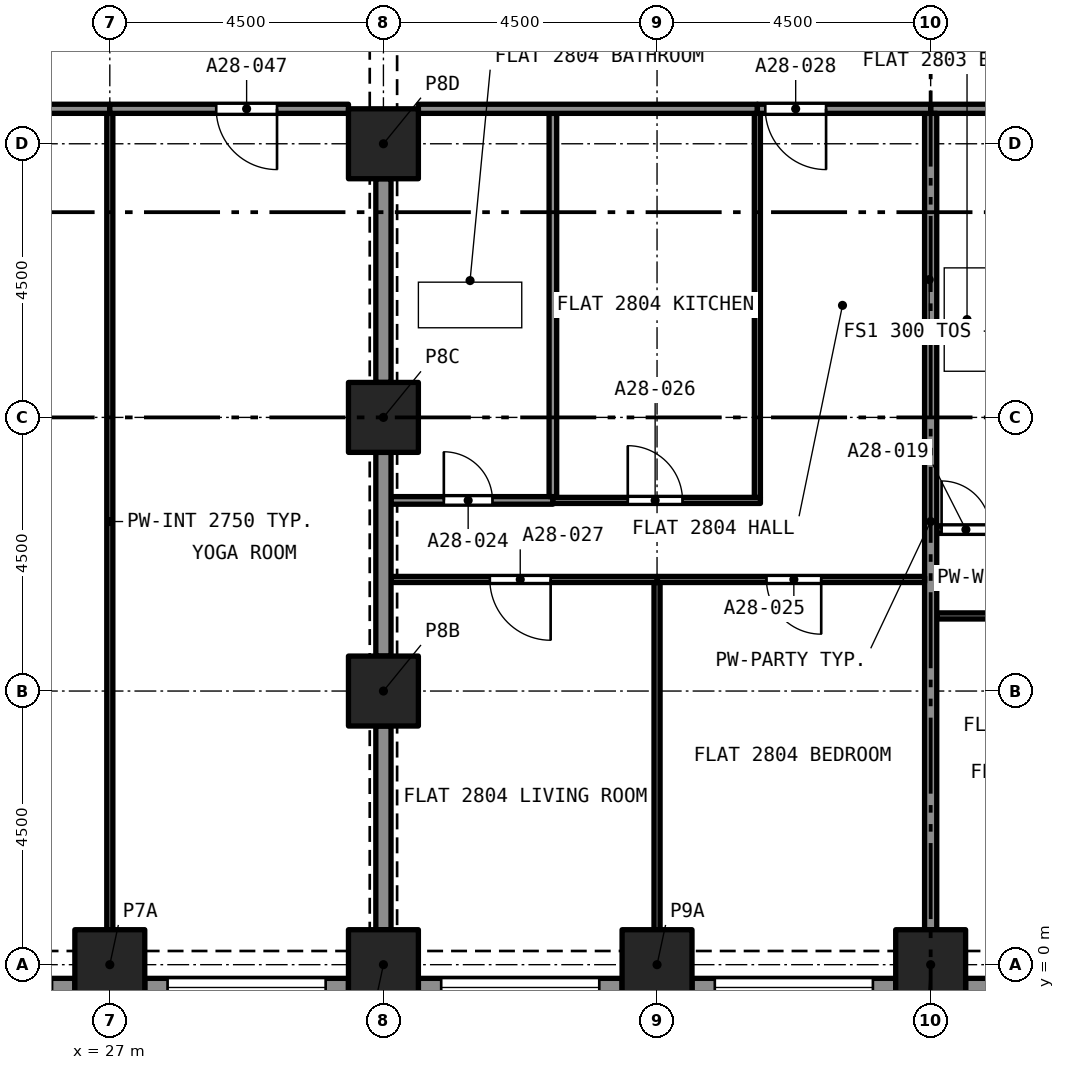
"""IFC4 building model, lengths in metres.
Left out: names, types, materials, properties, quantities, classifications, styles, units other than length and angle.
Written with IfcOpenShell. Run it as: python <this file> out.ifc"""

import sys

from ifc_helpers import new_model, si_unit, direction, frame, frame_2d, origin, origin_2d, place, context, subcontext, project, spatial, rectangle, extrude, element, fill, save


model = new_model("IFC4")
c1 = context("Model", 3, precision=1e-05, world=origin(), true_north=direction((0.0, 1.0)))
c2 = subcontext(c1, "Body", "Model", "MODEL_VIEW")
j1 = project(units=[si_unit("LENGTHUNIT", "METRE"), si_unit("PLANEANGLEUNIT", "RADIAN")], contexts=[c1])
p1 = place(None, origin())
s1 = spatial("IfcSite", under=j1, at=p1, CompositionType="ELEMENT")
p2 = place(p1, origin())
s2 = spatial("IfcBuilding", under=s1, at=p2, CompositionType="ELEMENT")
p3 = place(p2, frame((0.0, 0.0, 102.4)))
s3 = spatial("IfcBuildingStorey", under=s2, at=p3, CompositionType="ELEMENT", Elevation=102.4)
for number, where, z_axis, x_axis in (
    (1, (27.0, 0.0, 0.0), (0.0, 0.0, 1.0), (1.0, 0.0, 0.0)),
    (2, (31.5, 0.0, 0.0), (0.0, 0.0, 1.0), (1.0, 0.0, 0.0)),
    (3, (36.0, 0.0, 0.0), (0.0, 0.0, 1.0), (1.0, 0.0, 0.0)),
    (4, (40.5, 0.0, 0.0), (0.0, 0.0, 1.0), (1.0, 0.0, 0.0)),
    (5, (31.5, 4.5, 0.0), (0.0, 0.0, 1.0), (1.0, 0.0, 0.0)),
    (6, (31.5, 9.0, 0.0), (0.0, 0.0, 1.0), (1.0, 0.0, 0.0)),
    (7, (31.5, 13.5, 0.0), (0.0, 0.0, 1.0), (1.0, 0.0, 0.0)),
):
    element("IfcColumn", number, at=place(p3, frame(where, z_axis=z_axis, x_axis=x_axis)), inside=s3, PredefinedType="COLUMN", context=c2, shape_type="SweptSolid", body=[
        extrude(rectangle(XDim=1.15, YDim=1.15, at=origin_2d()), origin(), (0.0, 0.0, 1.0), 3.2),
    ])
p4 = place(p3, frame((26.425, -0.375, 0.0), z_axis=(0.0, 0.0, 1.0), x_axis=(-1.0, 0.0, 0.0)))
e8 = element("IfcWall", 8, at=p4, inside=s3, PredefinedType="SOLIDWALL", context=c2, shape_type="SweptSolid", body=[
    extrude(rectangle(XDim=3.35, YDim=0.3, at=frame_2d((1.675, 0.0))), origin(), (0.0, 0.0, 1.0), 3.2),
])
p5 = place(p4, frame((0.375, 0.0, 0.45)))
e9 = element("IfcOpeningElement", 9, at=p5, cuts=e8, PredefinedType="OPENING", context=c2, shape_type="SweptSolid", body=[
    extrude(rectangle(XDim=2.6, YDim=1.95, at=frame_2d((1.3, 0.975))), frame((0.0, 0.16, 0.0), z_axis=(0.0, -1.0, 0.0), x_axis=(1.0, 0.0, 0.0)), (0.0, 0.0, 1.0), 0.32),
])
p6 = place(p3, frame((30.925, -0.375, 0.0), z_axis=(0.0, 0.0, 1.0), x_axis=(-1.0, 0.0, 0.0)))
e10 = element("IfcWall", 10, at=p6, inside=s3, PredefinedType="SOLIDWALL", context=c2, shape_type="SweptSolid", body=[
    extrude(rectangle(XDim=3.35, YDim=0.3, at=frame_2d((1.675, 0.0))), origin(), (0.0, 0.0, 1.0), 3.2),
])
p7 = place(p6, frame((0.375, 0.0, 0.45)))
e11 = element("IfcOpeningElement", 11, at=p7, cuts=e10, PredefinedType="OPENING", context=c2, shape_type="SweptSolid", body=[
    extrude(rectangle(XDim=2.6, YDim=1.95, at=frame_2d((1.3, 0.975))), frame((0.0, 0.16, 0.0), z_axis=(0.0, -1.0, 0.0), x_axis=(1.0, 0.0, 0.0)), (0.0, 0.0, 1.0), 0.32),
])
p8 = place(p3, frame((35.425, -0.375, 0.0), z_axis=(0.0, 0.0, 1.0), x_axis=(-1.0, 0.0, 0.0)))
e12 = element("IfcWall", 12, at=p8, inside=s3, PredefinedType="SOLIDWALL", context=c2, shape_type="SweptSolid", body=[
    extrude(rectangle(XDim=3.35, YDim=0.3, at=frame_2d((1.675, 0.0))), origin(), (0.0, 0.0, 1.0), 3.2),
])
p9 = place(p8, frame((0.375, 0.0, 0.45)))
e13 = element("IfcOpeningElement", 13, at=p9, cuts=e12, PredefinedType="OPENING", context=c2, shape_type="SweptSolid", body=[
    extrude(rectangle(XDim=2.6, YDim=1.95, at=frame_2d((1.3, 0.975))), frame((0.0, 0.16, 0.0), z_axis=(0.0, -1.0, 0.0), x_axis=(1.0, 0.0, 0.0)), (0.0, 0.0, 1.0), 0.32),
])
p10 = place(p3, frame((39.925, -0.375, 0.0), z_axis=(0.0, 0.0, 1.0), x_axis=(-1.0, 0.0, 0.0)))
e14 = element("IfcWall", 14, at=p10, inside=s3, PredefinedType="SOLIDWALL", context=c2, shape_type="SweptSolid", body=[
    extrude(rectangle(XDim=3.35, YDim=0.3, at=frame_2d((1.675, 0.0))), origin(), (0.0, 0.0, 1.0), 3.2),
])
p11 = place(p10, frame((0.375, 0.0, 0.45)))
e15 = element("IfcOpeningElement", 15, at=p11, cuts=e14, PredefinedType="OPENING", context=c2, shape_type="SweptSolid", body=[
    extrude(rectangle(XDim=2.6, YDim=1.95, at=frame_2d((1.3, 0.975))), frame((0.0, 0.16, 0.0), z_axis=(0.0, -1.0, 0.0), x_axis=(1.0, 0.0, 0.0)), (0.0, 0.0, 1.0), 0.32),
])
p12 = place(p3, frame((44.425, -0.375, 0.0), z_axis=(0.0, 0.0, 1.0), x_axis=(-1.0, 0.0, 0.0)))
e16 = element("IfcWall", 16, at=p12, inside=s3, PredefinedType="SOLIDWALL", context=c2, shape_type="SweptSolid", body=[
    extrude(rectangle(XDim=3.35, YDim=0.3, at=frame_2d((1.675, 0.0))), origin(), (0.0, 0.0, 1.0), 3.2),
])
p13 = place(p12, frame((0.375, 0.0, 0.45)))
e17 = element("IfcOpeningElement", 17, at=p13, cuts=e16, PredefinedType="OPENING", context=c2, shape_type="SweptSolid", body=[
    extrude(rectangle(XDim=2.6, YDim=1.95, at=frame_2d((1.3, 0.975))), frame((0.0, 0.16, 0.0), z_axis=(0.0, -1.0, 0.0), x_axis=(1.0, 0.0, 0.0)), (0.0, 0.0, 1.0), 0.32),
])
p14 = place(p3, frame((40.6, 7.155, 0.0), z_axis=(0.0, 0.0, 1.0), x_axis=(1.0, 0.0, 0.0)))
e18 = element("IfcWall", 18, at=p14, inside=s3, PredefinedType="PARTITIONING", context=c2, shape_type="SweptSolid", body=[
    extrude(rectangle(XDim=1.059, YDim=0.125, at=frame_2d((0.53, 0.0))), origin(), (0.0, 0.0, 1.0), 2.9),
])
p15 = place(p14, frame((0.08, 0.0, 0.0)))
e19 = element("IfcOpeningElement", 19, at=p15, cuts=e18, PredefinedType="OPENING", context=c2, shape_type="SweptSolid", body=[
    extrude(rectangle(XDim=0.8, YDim=2.1, at=frame_2d((0.4, 1.05))), frame((0.0, 0.073, 0.0), z_axis=(0.0, -1.0, 0.0), x_axis=(1.0, 0.0, 0.0)), (0.0, 0.0, 1.0), 0.145),
])
p16 = place(p3, frame((40.5, 14.075, 0.0), z_axis=(0.0, 0.0, 1.0), x_axis=(1.0, 0.0, 0.0)))
e20 = element("IfcWall", 20, at=p16, inside=s3, PredefinedType="PARTITIONING", context=c2, shape_type="SweptSolid", body=[
    extrude(rectangle(XDim=2.55, YDim=0.15, at=frame_2d((1.275, 0.0))), origin(), (0.0, 0.0, 1.0), 2.9),
])
p17 = place(p3, frame((44.95, 5.735, 0.0), z_axis=(0.0, 0.0, 1.0), x_axis=(-1.0, 0.0, 0.0)))
e21 = element("IfcWall", 21, at=p17, inside=s3, PredefinedType="PARTITIONING", context=c2, shape_type="SweptSolid", body=[
    extrude(rectangle(XDim=4.35, YDim=0.1, at=frame_2d((2.175, 0.0))), origin(), (0.0, 0.0, 1.0), 2.9),
])
p18 = place(p17, frame((1.75, 0.0, 0.0)))
e22 = element("IfcOpeningElement", 22, at=p18, cuts=e21, PredefinedType="OPENING", context=c2, shape_type="SweptSolid", body=[
    extrude(rectangle(XDim=0.9, YDim=2.1, at=frame_2d((0.45, 1.05))), frame((0.0, 0.06, 0.0), z_axis=(0.0, -1.0, 0.0), x_axis=(1.0, 0.0, 0.0)), (0.0, 0.0, 1.0), 0.12),
])
p19 = place(p3, frame((40.5, 0.575, 0.0), z_axis=(0.0, 0.0, 1.0), x_axis=(0.0, 1.0, 0.0)))
e23 = element("IfcWall", 23, at=p19, inside=s3, PredefinedType="PARTITIONING", context=c2, shape_type="SweptSolid", body=[
    extrude(rectangle(XDim=13.425, YDim=0.2, at=frame_2d((6.712, 0.0))), origin(), (0.0, 0.0, 1.0), 2.9),
])
p20 = place(p3, frame((31.625, 7.635, 0.0), z_axis=(0.0, 0.0, 1.0), x_axis=(1.0, 0.0, 0.0)))
e24 = element("IfcWall", 24, at=p20, inside=s3, PredefinedType="PARTITIONING", context=c2, shape_type="SweptSolid", body=[
    extrude(rectangle(XDim=2.662, YDim=0.125, at=frame_2d((1.331, 0.0))), origin(), (0.0, 0.0, 1.0), 2.9),
])
p21 = place(p20, frame((0.868, 0.0, 0.0)))
e25 = element("IfcOpeningElement", 25, at=p21, cuts=e24, PredefinedType="OPENING", context=c2, shape_type="SweptSolid", body=[
    extrude(rectangle(XDim=0.8, YDim=2.1, at=frame_2d((0.4, 1.05))), frame((0.0, 0.073, 0.0), z_axis=(0.0, -1.0, 0.0), x_axis=(1.0, 0.0, 0.0)), (0.0, 0.0, 1.0), 0.145),
])
p22 = place(p3, frame((34.287, 7.698, 0.0), z_axis=(0.0, 0.0, 1.0), x_axis=(0.0, 1.0, 0.0)))
e26 = element("IfcWall", 26, at=p22, inside=s3, PredefinedType="PARTITIONING", context=c2, shape_type="SweptSolid", body=[
    extrude(rectangle(XDim=6.302, YDim=0.125, at=frame_2d((3.151, 0.0))), origin(), (0.0, 0.0, 1.0), 2.9),
])
p23 = place(p3, frame((31.5, 9.575, 0.0), z_axis=(0.0, 0.0, 1.0), x_axis=(0.0, 1.0, 0.0)))
e27 = element("IfcWall", 27, at=p23, inside=s3, PredefinedType="PARTITIONING", context=c2, shape_type="SweptSolid", body=[
    extrude(rectangle(XDim=3.35, YDim=0.25, at=frame_2d((1.675, 0.0))), origin(), (0.0, 0.0, 1.0), 2.38),
])
p24 = place(p3, frame((32.075, 14.075, 0.0), z_axis=(0.0, 0.0, 1.0), x_axis=(1.0, 0.0, 0.0)))
e28 = element("IfcWall", 28, at=p24, inside=s3, PredefinedType="PARTITIONING", context=c2, shape_type="SweptSolid", body=[
    extrude(rectangle(XDim=5.575, YDim=0.15, at=frame_2d((2.788, 0.0))), origin(), (0.0, 0.0, 1.0), 2.9),
])
p25 = place(p3, frame((40.4, 6.335, 0.0), z_axis=(0.0, 0.0, 1.0), x_axis=(-1.0, 0.0, 0.0)))
e29 = element("IfcWall", 29, at=p25, inside=s3, PredefinedType="PARTITIONING", context=c2, shape_type="SweptSolid", body=[
    extrude(rectangle(XDim=4.4, YDim=0.1, at=frame_2d((2.2, 0.0))), origin(), (0.0, 0.0, 1.0), 2.9),
])
p26 = place(p25, frame((1.7, 0.0, 0.0)))
e30 = element("IfcOpeningElement", 30, at=p26, cuts=e29, PredefinedType="OPENING", context=c2, shape_type="SweptSolid", body=[
    extrude(rectangle(XDim=0.9, YDim=2.1, at=frame_2d((0.45, 1.05))), frame((0.0, 0.06, 0.0), z_axis=(0.0, -1.0, 0.0), x_axis=(1.0, 0.0, 0.0)), (0.0, 0.0, 1.0), 0.12),
])
p27 = place(p3, frame((36.0, 0.575, 0.0), z_axis=(0.0, 0.0, 1.0), x_axis=(0.0, 1.0, 0.0)))
e31 = element("IfcWall", 31, at=p27, inside=s3, PredefinedType="PARTITIONING", context=c2, shape_type="SweptSolid", body=[
    extrude(rectangle(XDim=5.71, YDim=0.1, at=frame_2d((2.855, 0.0))), origin(), (0.0, 0.0, 1.0), 2.9),
])
p28 = place(p3, frame((34.287, 7.635, 0.0), z_axis=(0.0, 0.0, 1.0), x_axis=(1.0, 0.0, 0.0)))
e32 = element("IfcWall", 32, at=p28, inside=s3, PredefinedType="PARTITIONING", context=c2, shape_type="SweptSolid", body=[
    extrude(rectangle(XDim=3.413, YDim=0.1, at=frame_2d((1.707, 0.0))), origin(), (0.0, 0.0, 1.0), 2.9),
])
p29 = place(p28, frame((1.231, 0.0, 0.0)))
e33 = element("IfcOpeningElement", 33, at=p29, cuts=e32, PredefinedType="OPENING", context=c2, shape_type="SweptSolid", body=[
    extrude(rectangle(XDim=0.9, YDim=2.1, at=frame_2d((0.45, 1.05))), frame((0.0, 0.06, 0.0), z_axis=(0.0, -1.0, 0.0), x_axis=(1.0, 0.0, 0.0)), (0.0, 0.0, 1.0), 0.12),
])
p30 = place(p3, frame((37.65, 7.685, 0.0), z_axis=(0.0, 0.0, 1.0), x_axis=(0.0, 1.0, 0.0)))
e34 = element("IfcWall", 34, at=p30, inside=s3, PredefinedType="PARTITIONING", context=c2, shape_type="SweptSolid", body=[
    extrude(rectangle(XDim=6.315, YDim=0.1, at=frame_2d((3.157, 0.0))), origin(), (0.0, 0.0, 1.0), 2.9),
])
p31 = place(p3, frame((36.0, 6.335, 0.0), z_axis=(0.0, 0.0, 1.0), x_axis=(-1.0, 0.0, 0.0)))
e35 = element("IfcWall", 35, at=p31, inside=s3, PredefinedType="PARTITIONING", context=c2, shape_type="SweptSolid", body=[
    extrude(rectangle(XDim=4.375, YDim=0.1, at=frame_2d((2.188, 0.0))), origin(), (0.0, 0.0, 1.0), 2.9),
])
p32 = place(p31, frame((1.75, 0.0, 0.0)))
e36 = element("IfcOpeningElement", 36, at=p32, cuts=e35, PredefinedType="OPENING", context=c2, shape_type="SweptSolid", body=[
    extrude(rectangle(XDim=1.0, YDim=2.1, at=frame_2d((0.5, 1.05))), frame((0.0, 0.06, 0.0), z_axis=(0.0, -1.0, 0.0), x_axis=(1.0, 0.0, 0.0)), (0.0, 0.0, 1.0), 0.12),
])
p33 = place(p3, frame((40.5, 14.075, 0.0), z_axis=(0.0, 0.0, 1.0), x_axis=(-1.0, 0.0, 0.0)))
e37 = element("IfcWall", 37, at=p33, inside=s3, PredefinedType="PARTITIONING", context=c2, shape_type="SweptSolid", body=[
    extrude(rectangle(XDim=2.85, YDim=0.15, at=frame_2d((1.425, 0.0))), origin(), (0.0, 0.0, 1.0), 2.9),
])
p34 = place(p33, frame((1.72, 0.0, 0.0)))
e38 = element("IfcOpeningElement", 38, at=p34, cuts=e37, PredefinedType="OPENING", context=c2, shape_type="SweptSolid", body=[
    extrude(rectangle(XDim=1.0, YDim=2.1, at=frame_2d((0.5, 1.05))), frame((0.0, 0.085, 0.0), z_axis=(0.0, -1.0, 0.0), x_axis=(1.0, 0.0, 0.0)), (0.0, 0.0, 1.0), 0.17),
])
for number, where, z_axis, x_axis in (
    (39, (31.5, 0.575, 0.0), (0.0, 0.0, 1.0), (0.0, 1.0, 0.0)),
    (40, (31.5, 5.075, 0.0), (0.0, 0.0, 1.0), (0.0, 1.0, 0.0)),
):
    element("IfcWall", number, at=place(p3, frame(where, z_axis=z_axis, x_axis=x_axis)), inside=s3, PredefinedType="PARTITIONING", context=c2, shape_type="SweptSolid", body=[
        extrude(rectangle(XDim=3.35, YDim=0.25, at=frame_2d((1.675, 0.0))), origin(), (0.0, 0.0, 1.0), 2.38),
    ])
p35 = place(p3, frame((27.0, 0.575, 0.0), z_axis=(0.0, 0.0, 1.0), x_axis=(0.0, 1.0, 0.0)))
e41 = element("IfcWall", 41, at=p35, inside=s3, PredefinedType="PARTITIONING", context=c2, shape_type="SweptSolid", body=[
    extrude(rectangle(XDim=13.425, YDim=0.1, at=frame_2d((6.712, 0.0))), origin(), (0.0, 0.0, 1.0), 2.75),
])
p36 = place(p3, frame((27.0, 14.075, 0.0), z_axis=(0.0, 0.0, 1.0), x_axis=(-1.0, 0.0, 0.0)))
e42 = element("IfcWall", 42, at=p36, inside=s3, PredefinedType="PARTITIONING", context=c2, shape_type="SweptSolid", body=[
    extrude(rectangle(XDim=8.425, YDim=0.15, at=frame_2d((4.212, 0.0))), origin(), (0.0, 0.0, 1.0), 2.75),
])
p37 = place(p36, frame((4.0, 0.0, 0.0)))
e43 = element("IfcOpeningElement", 43, at=p37, cuts=e42, PredefinedType="OPENING", context=c2, shape_type="SweptSolid", body=[
    extrude(rectangle(XDim=1.0, YDim=2.1, at=frame_2d((0.5, 1.05))), frame((0.0, 0.085, 0.0), z_axis=(0.0, -1.0, 0.0), x_axis=(1.0, 0.0, 0.0)), (0.0, 0.0, 1.0), 0.17),
])
p38 = place(p3, frame((30.925, 14.075, 0.0), z_axis=(0.0, 0.0, 1.0), x_axis=(-1.0, 0.0, 0.0)))
e44 = element("IfcWall", 44, at=p38, inside=s3, PredefinedType="PARTITIONING", context=c2, shape_type="SweptSolid", body=[
    extrude(rectangle(XDim=3.925, YDim=0.15, at=frame_2d((1.962, 0.0))), origin(), (0.0, 0.0, 1.0), 2.75),
])
p39 = place(p38, frame((1.175, 0.0, 0.0)))
e45 = element("IfcOpeningElement", 45, at=p39, cuts=e44, PredefinedType="OPENING", context=c2, shape_type="SweptSolid", body=[
    extrude(rectangle(XDim=1.0, YDim=2.1, at=frame_2d((0.5, 1.05))), frame((0.0, 0.085, 0.0), z_axis=(0.0, -1.0, 0.0), x_axis=(1.0, 0.0, 0.0)), (0.0, 0.0, 1.0), 0.17),
])
p40 = place(p7, origin())
e46 = element("IfcWindow", 46, at=p40, inside=s3, PartitioningType="SINGLE_PANEL", PredefinedType="WINDOW", context=c2, shape_type="SweptSolid", body=[
    extrude(rectangle(XDim=2.6, YDim=1.95, at=frame_2d((1.3, 0.975))), frame((0.0, 0.03, 0.0), z_axis=(0.0, -1.0, 0.0), x_axis=(1.0, 0.0, 0.0)), (0.0, 0.0, 1.0), 0.06),
])
fill(e11, e46)
p41 = place(p9, origin())
e47 = element("IfcWindow", 47, at=p41, inside=s3, PartitioningType="SINGLE_PANEL", PredefinedType="WINDOW", context=c2, shape_type="SweptSolid", body=[
    extrude(rectangle(XDim=2.6, YDim=1.95, at=frame_2d((1.3, 0.975))), frame((0.0, 0.03, 0.0), z_axis=(0.0, -1.0, 0.0), x_axis=(1.0, 0.0, 0.0)), (0.0, 0.0, 1.0), 0.06),
])
fill(e13, e47)
p42 = place(p11, origin())
e48 = element("IfcWindow", 48, at=p42, inside=s3, PartitioningType="SINGLE_PANEL", PredefinedType="WINDOW", context=c2, shape_type="SweptSolid", body=[
    extrude(rectangle(XDim=2.6, YDim=1.95, at=frame_2d((1.3, 0.975))), frame((0.0, 0.03, 0.0), z_axis=(0.0, -1.0, 0.0), x_axis=(1.0, 0.0, 0.0)), (0.0, 0.0, 1.0), 0.06),
])
fill(e15, e48)
p43 = place(p15, origin())
e49 = element("IfcDoor", 49, at=p43, inside=s3, OperationType="SINGLE_SWING_LEFT", PredefinedType="DOOR", context=c2, shape_type="SweptSolid", body=[
    extrude(rectangle(XDim=0.8, YDim=2.1, at=frame_2d((0.4, 1.05))), frame((0.0, 0.025, 0.0), z_axis=(0.0, -1.0, 0.0), x_axis=(1.0, 0.0, 0.0)), (0.0, 0.0, 1.0), 0.05),
])
fill(e19, e49)
p44 = place(p21, origin())
e50 = element("IfcDoor", 50, at=p44, inside=s3, OperationType="SINGLE_SWING_LEFT", PredefinedType="DOOR", context=c2, shape_type="SweptSolid", body=[
    extrude(rectangle(XDim=0.8, YDim=2.1, at=frame_2d((0.4, 1.05))), frame((0.0, 0.025, 0.0), z_axis=(0.0, -1.0, 0.0), x_axis=(1.0, 0.0, 0.0)), (0.0, 0.0, 1.0), 0.05),
])
fill(e25, e50)
p45 = place(p26, origin())
e51 = element("IfcDoor", 51, at=p45, inside=s3, OperationType="SINGLE_SWING_LEFT", PredefinedType="DOOR", context=c2, shape_type="SweptSolid", body=[
    extrude(rectangle(XDim=0.9, YDim=2.1, at=frame_2d((0.45, 1.05))), frame((0.0, 0.025, 0.0), z_axis=(0.0, -1.0, 0.0), x_axis=(1.0, 0.0, 0.0)), (0.0, 0.0, 1.0), 0.05),
])
fill(e30, e51)
p46 = place(p29, origin())
e52 = element("IfcDoor", 52, at=p46, inside=s3, OperationType="SINGLE_SWING_LEFT", PredefinedType="DOOR", context=c2, shape_type="SweptSolid", body=[
    extrude(rectangle(XDim=0.9, YDim=2.1, at=frame_2d((0.45, 1.05))), frame((0.0, 0.025, 0.0), z_axis=(0.0, -1.0, 0.0), x_axis=(1.0, 0.0, 0.0)), (0.0, 0.0, 1.0), 0.05),
])
fill(e33, e52)
p47 = place(p32, origin())
e53 = element("IfcDoor", 53, at=p47, inside=s3, OperationType="SINGLE_SWING_RIGHT", PredefinedType="DOOR", context=c2, shape_type="SweptSolid", body=[
    extrude(rectangle(XDim=1.0, YDim=2.1, at=frame_2d((0.5, 1.05))), frame((0.0, 0.025, 0.0), z_axis=(0.0, -1.0, 0.0), x_axis=(1.0, 0.0, 0.0)), (0.0, 0.0, 1.0), 0.05),
])
fill(e36, e53)
p48 = place(p34, origin())
e54 = element("IfcDoor", 54, at=p48, inside=s3, OperationType="SINGLE_SWING_RIGHT", PredefinedType="DOOR", context=c2, shape_type="SweptSolid", body=[
    extrude(rectangle(XDim=1.0, YDim=2.1, at=frame_2d((0.5, 1.05))), frame((0.0, 0.025, 0.0), z_axis=(0.0, -1.0, 0.0), x_axis=(1.0, 0.0, 0.0)), (0.0, 0.0, 1.0), 0.05),
])
fill(e38, e54)
p49 = place(p39, origin())
e55 = element("IfcDoor", 55, at=p49, inside=s3, OperationType="SINGLE_SWING_LEFT", PredefinedType="DOOR", context=c2, shape_type="SweptSolid", body=[
    extrude(rectangle(XDim=1.0, YDim=2.1, at=frame_2d((0.5, 1.05))), frame((0.0, 0.025, 0.0), z_axis=(0.0, -1.0, 0.0), x_axis=(1.0, 0.0, 0.0)), (0.0, 0.0, 1.0), 0.05),
])
fill(e45, e55)
save(model, sys.argv[1])
